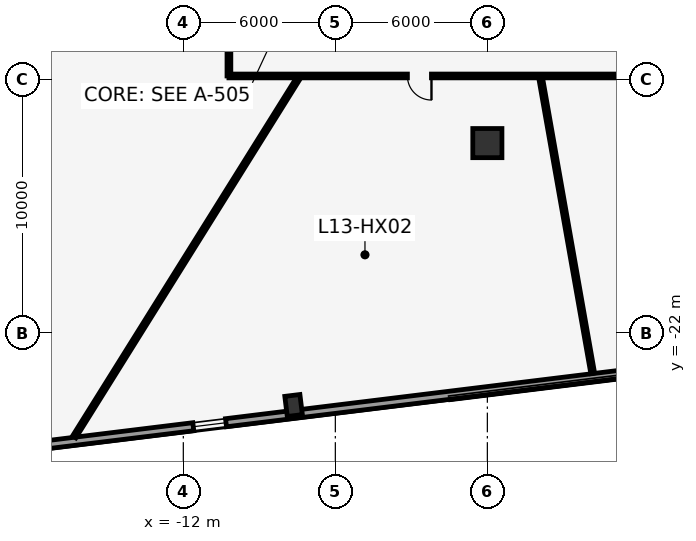
"""IFC4 building model, lengths in metres.
Left out: names, types, materials, properties, quantities, classifications, styles, units other than length and angle.
Written with IfcOpenShell. Run it as: python <this file> out.ifc"""

import sys

from ifc_helpers import new_model, si_unit, direction, frame, frame_2d, origin, origin_2d, place, context, subcontext, project, spatial, rectangle, hollow_rectangle, extrude, element, fill, save


model = new_model("IFC4")
c1 = context("Model", 3, precision=1e-05, world=origin(), true_north=direction((0.0, 1.0)))
c2 = subcontext(c1, "Body", "Model", "MODEL_VIEW")
j1 = project(units=[si_unit("LENGTHUNIT", "METRE"), si_unit("PLANEANGLEUNIT", "RADIAN")], contexts=[c1])
p1 = place(None, origin())
s1 = spatial("IfcSite", under=j1, at=p1, CompositionType="ELEMENT")
p2 = place(p1, origin())
s2 = spatial("IfcBuilding", under=s1, at=p2, CompositionType="ELEMENT")
p3 = place(p2, frame((0.0, 0.0, 62.4)))
s3 = spatial("IfcBuildingStorey", under=s2, at=p3, CompositionType="ELEMENT", Elevation=62.4)
p4 = place(p3, frame((0.0, -14.5, 0.0), z_axis=(0.0, 0.0, 1.0), x_axis=(1.0, 0.0, 0.0)))
e1 = element("IfcColumn", 1, at=p4, inside=s3, PredefinedType="COLUMN", context=c2, shape_type="SweptSolid", body=[
    extrude(rectangle(XDim=1.15, YDim=1.15, at=origin_2d()), origin(), (0.0, 0.0, 1.0), 4.6),
])
p5 = place(p3, frame((-7.647, -24.856, 0.0), z_axis=(0.0, 0.0, 1.0), x_axis=(0.992546151641, 0.121869343405, 0.0)))
e2 = element("IfcColumn", 2, at=p5, inside=s3, PredefinedType="COLUMN", context=c2, shape_type="SweptSolid", body=[
    extrude(hollow_rectangle(XDim=0.6, YDim=0.8, WallThickness=0.05, at=origin_2d()), origin(), (0.0, 0.0, 1.0), 4.6),
])
p6 = place(p3, frame((-0.115, 39.555, 0.0), z_axis=(0.0, 0.0, 1.0), x_axis=(0.605877389385, -0.795558036243, 0.0)))
e3 = element("IfcWall", 3, at=p6, inside=s3, PredefinedType="STANDARD", context=c2, shape_type="SweptSolid", body=[
    extrude(rectangle(XDim=64.058, YDim=0.32, at=frame_2d((32.029, 0.0))), origin(), (0.0, 0.0, 1.0), 4.35),
])
p7 = place(p6, frame((6.179, 0.0, 0.85)))
e4 = element("IfcOpeningElement", 4, at=p7, cuts=e3, PredefinedType="OPENING", context=c2, shape_type="SweptSolid", body=[
    extrude(rectangle(XDim=1.3, YDim=2.1, at=frame_2d((0.65, 1.05))), frame((0.0, 0.17, 0.0), z_axis=(0.0, -1.0, 0.0), x_axis=(1.0, 0.0, 0.0)), (0.0, 0.0, 1.0), 0.34),
])
p8 = place(p6, frame((11.779, 0.0, 0.85)))
e5 = element("IfcOpeningElement", 5, at=p8, cuts=e3, PredefinedType="OPENING", context=c2, shape_type="SweptSolid", body=[
    extrude(rectangle(XDim=1.3, YDim=2.1, at=frame_2d((0.65, 1.05))), frame((0.0, 0.17, 0.0), z_axis=(0.0, -1.0, 0.0), x_axis=(1.0, 0.0, 0.0)), (0.0, 0.0, 1.0), 0.34),
])
p9 = place(p6, frame((17.379, 0.0, 0.85)))
e6 = element("IfcOpeningElement", 6, at=p9, cuts=e3, PredefinedType="OPENING", context=c2, shape_type="SweptSolid", body=[
    extrude(rectangle(XDim=1.3, YDim=2.1, at=frame_2d((0.65, 1.05))), frame((0.0, 0.17, 0.0), z_axis=(0.0, -1.0, 0.0), x_axis=(1.0, 0.0, 0.0)), (0.0, 0.0, 1.0), 0.34),
])
p10 = place(p6, frame((50.979, 0.0, 0.85)))
e7 = element("IfcOpeningElement", 7, at=p10, cuts=e3, PredefinedType="OPENING", context=c2, shape_type="SweptSolid", body=[
    extrude(rectangle(XDim=1.3, YDim=2.1, at=frame_2d((0.65, 1.05))), frame((0.0, 0.17, 0.0), z_axis=(0.0, -1.0, 0.0), x_axis=(1.0, 0.0, 0.0)), (0.0, 0.0, 1.0), 0.34),
])
p11 = place(p6, frame((56.579, 0.0, 0.85)))
e8 = element("IfcOpeningElement", 8, at=p11, cuts=e3, PredefinedType="OPENING", context=c2, shape_type="SweptSolid", body=[
    extrude(rectangle(XDim=1.3, YDim=2.1, at=frame_2d((0.65, 1.05))), frame((0.0, 0.17, 0.0), z_axis=(0.0, -1.0, 0.0), x_axis=(1.0, 0.0, 0.0)), (0.0, 0.0, 1.0), 0.34),
])
p12 = place(p3, frame((35.091, -19.961, 0.0), z_axis=(0.0, 0.0, 1.0), x_axis=(-0.992546286146, -0.121868247946, 0.0)))
e9 = element("IfcWall", 9, at=p12, inside=s3, PredefinedType="STANDARD", context=c2, shape_type="SweptSolid", body=[
    extrude(rectangle(XDim=64.793, YDim=0.32, at=frame_2d((32.396, 0.0))), origin(), (0.0, 0.0, 1.0), 4.35),
])
p13 = place(p12, frame((12.147, 0.0, 0.85)))
e10 = element("IfcOpeningElement", 10, at=p13, cuts=e9, PredefinedType="OPENING", context=c2, shape_type="SweptSolid", body=[
    extrude(rectangle(XDim=1.3, YDim=2.1, at=frame_2d((0.65, 1.05))), frame((0.0, 0.17, 0.0), z_axis=(0.0, -1.0, 0.0), x_axis=(1.0, 0.0, 0.0)), (0.0, 0.0, 1.0), 0.34),
])
p14 = place(p12, frame((17.747, 0.0, 0.85)))
e11 = element("IfcOpeningElement", 11, at=p14, cuts=e9, PredefinedType="OPENING", context=c2, shape_type="SweptSolid", body=[
    extrude(rectangle(XDim=1.3, YDim=2.1, at=frame_2d((0.65, 1.05))), frame((0.0, 0.17, 0.0), z_axis=(0.0, -1.0, 0.0), x_axis=(1.0, 0.0, 0.0)), (0.0, 0.0, 1.0), 0.34),
])
p15 = place(p12, frame((45.747, 0.0, 0.85)))
e12 = element("IfcOpeningElement", 12, at=p15, cuts=e9, PredefinedType="OPENING", context=c2, shape_type="SweptSolid", body=[
    extrude(rectangle(XDim=1.3, YDim=2.1, at=frame_2d((0.65, 1.05))), frame((0.0, 0.17, 0.0), z_axis=(0.0, -1.0, 0.0), x_axis=(1.0, 0.0, 0.0)), (0.0, 0.0, 1.0), 0.34),
])
p16 = place(p12, frame((56.947, 0.0, 0.85)))
e13 = element("IfcOpeningElement", 13, at=p16, cuts=e9, PredefinedType="OPENING", context=c2, shape_type="SweptSolid", body=[
    extrude(rectangle(XDim=1.3, YDim=2.1, at=frame_2d((0.65, 1.05))), frame((0.0, 0.17, 0.0), z_axis=(0.0, -1.0, 0.0), x_axis=(1.0, 0.0, 0.0)), (0.0, 0.0, 1.0), 0.34),
])
p17 = place(p3, frame((-34.787, -20.429, 0.0), z_axis=(0.0, 0.0, 1.0), x_axis=(0.395418293843, 0.91850115563, 0.0)))
e14 = element("IfcWall", 14, at=p17, inside=s3, PredefinedType="STANDARD", context=c2, shape_type="SweptSolid", body=[
    extrude(rectangle(XDim=64.058, YDim=0.32, at=frame_2d((32.029, 0.0))), origin(), (0.0, 0.0, 1.0), 4.35),
])
p18 = place(p17, frame((23.542, 0.0, 0.0)))
e15 = element("IfcOpeningElement", 15, at=p18, cuts=e14, PredefinedType="OPENING", context=c2, shape_type="SweptSolid", body=[
    extrude(rectangle(XDim=1.6, YDim=2.2, at=frame_2d((0.8, 1.1))), frame((0.0, 0.17, 0.0), z_axis=(0.0, -1.0, 0.0), x_axis=(1.0, 0.0, 0.0)), (0.0, 0.0, 1.0), 0.34),
])
p19 = place(p17, frame((6.179, 0.0, 0.85)))
e16 = element("IfcOpeningElement", 16, at=p19, cuts=e14, PredefinedType="OPENING", context=c2, shape_type="SweptSolid", body=[
    extrude(rectangle(XDim=1.3, YDim=2.1, at=frame_2d((0.65, 1.05))), frame((0.0, 0.17, 0.0), z_axis=(0.0, -1.0, 0.0), x_axis=(1.0, 0.0, 0.0)), (0.0, 0.0, 1.0), 0.34),
])
p20 = place(p17, frame((17.379, 0.0, 0.85)))
e17 = element("IfcOpeningElement", 17, at=p20, cuts=e14, PredefinedType="OPENING", context=c2, shape_type="SweptSolid", body=[
    extrude(rectangle(XDim=1.3, YDim=2.1, at=frame_2d((0.65, 1.05))), frame((0.0, 0.17, 0.0), z_axis=(0.0, -1.0, 0.0), x_axis=(1.0, 0.0, 0.0)), (0.0, 0.0, 1.0), 0.34),
])
p21 = place(p17, frame((45.379, 0.0, 0.85)))
e18 = element("IfcOpeningElement", 18, at=p21, cuts=e14, PredefinedType="OPENING", context=c2, shape_type="SweptSolid", body=[
    extrude(rectangle(XDim=1.3, YDim=2.1, at=frame_2d((0.65, 1.05))), frame((0.0, 0.17, 0.0), z_axis=(0.0, -1.0, 0.0), x_axis=(1.0, 0.0, 0.0)), (0.0, 0.0, 1.0), 0.34),
])
p22 = place(p17, frame((50.979, 0.0, 0.85)))
e19 = element("IfcOpeningElement", 19, at=p22, cuts=e14, PredefinedType="OPENING", context=c2, shape_type="SweptSolid", body=[
    extrude(rectangle(XDim=1.3, YDim=2.1, at=frame_2d((0.65, 1.05))), frame((0.0, 0.17, 0.0), z_axis=(0.0, -1.0, 0.0), x_axis=(1.0, 0.0, 0.0)), (0.0, 0.0, 1.0), 0.34),
])
p23 = place(p17, frame((56.579, 0.0, 0.85)))
e20 = element("IfcOpeningElement", 20, at=p23, cuts=e14, PredefinedType="OPENING", context=c2, shape_type="SweptSolid", body=[
    extrude(rectangle(XDim=1.3, YDim=2.1, at=frame_2d((0.65, 1.05))), frame((0.0, 0.17, 0.0), z_axis=(0.0, -1.0, 0.0), x_axis=(1.0, 0.0, 0.0)), (0.0, 0.0, 1.0), 0.34),
])
p24 = place(p3, frame((10.2, -11.85, 0.0), z_axis=(0.0, 0.0, 1.0), x_axis=(-1.0, 0.0, 0.0)))
e21 = element("IfcWall", 21, at=p24, inside=s3, PredefinedType="PARTITIONING", context=c2, shape_type="SweptSolid", body=[
    extrude(rectangle(XDim=20.4, YDim=0.15, at=frame_2d((10.2, 0.0))), origin(), (0.0, 0.0, 1.0), 4.35),
])
p25 = place(p24, frame((12.406, 0.0, 0.0)))
e22 = element("IfcOpeningElement", 22, at=p25, cuts=e21, PredefinedType="OPENING", context=c2, shape_type="SweptSolid", body=[
    extrude(rectangle(XDim=0.95, YDim=2.15, at=frame_2d((0.475, 1.075))), frame((0.0, 0.085, 0.0), z_axis=(0.0, -1.0, 0.0), x_axis=(1.0, 0.0, 0.0)), (0.0, 0.0, 1.0), 0.17),
])
p26 = place(p24, frame((3.701, 0.0, 0.0)))
e23 = element("IfcOpeningElement", 23, at=p26, cuts=e21, PredefinedType="OPENING", context=c2, shape_type="SweptSolid", body=[
    extrude(rectangle(XDim=0.95, YDim=2.15, at=frame_2d((0.475, 1.075))), frame((0.0, 0.085, 0.0), z_axis=(0.0, -1.0, 0.0), x_axis=(1.0, 0.0, 0.0)), (0.0, 0.0, 1.0), 0.17),
])
p27 = place(p3, frame((-10.2, -11.85, 0.0), z_axis=(0.0, 0.0, 1.0), x_axis=(0.0, 1.0, 0.0)))
e24 = element("IfcWall", 24, at=p27, inside=s3, PredefinedType="PARTITIONING", context=c2, shape_type="SweptSolid", body=[
    extrude(rectangle(XDim=24.0, YDim=0.15, at=frame_2d((12.0, 0.0))), origin(), (0.0, 0.0, 1.0), 4.35),
])
p28 = place(p27, frame((11.995, 0.0, 0.0)))
e25 = element("IfcOpeningElement", 25, at=p28, cuts=e24, PredefinedType="OPENING", context=c2, shape_type="SweptSolid", body=[
    extrude(rectangle(XDim=0.95, YDim=2.15, at=frame_2d((0.475, 1.075))), frame((0.0, 0.085, 0.0), z_axis=(0.0, -1.0, 0.0), x_axis=(1.0, 0.0, 0.0)), (0.0, 0.0, 1.0), 0.17),
])
p29 = place(p27, frame((3.905, 0.0, 0.0)))
e26 = element("IfcOpeningElement", 26, at=p29, cuts=e24, PredefinedType="OPENING", context=c2, shape_type="SweptSolid", body=[
    extrude(rectangle(XDim=0.95, YDim=2.15, at=frame_2d((0.475, 1.075))), frame((0.0, 0.085, 0.0), z_axis=(0.0, -1.0, 0.0), x_axis=(1.0, 0.0, 0.0)), (0.0, 0.0, 1.0), 0.17),
])
p30 = place(p27, frame((19.615, 0.0, 0.0)))
e27 = element("IfcOpeningElement", 27, at=p30, cuts=e24, PredefinedType="OPENING", context=c2, shape_type="SweptSolid", body=[
    extrude(rectangle(XDim=0.95, YDim=2.15, at=frame_2d((0.475, 1.075))), frame((0.0, 0.085, 0.0), z_axis=(0.0, -1.0, 0.0), x_axis=(1.0, 0.0, 0.0)), (0.0, 0.0, 1.0), 0.17),
])
p31 = place(p3, frame((-7.47, -11.955, 0.0), z_axis=(0.0, 0.0, 1.0), x_axis=(-0.529931816238, -0.848040252664, 0.0)))
e28 = element("IfcWall", 28, at=p31, inside=s3, PredefinedType="PARTITIONING", context=c2, shape_type="SweptSolid", body=[
    extrude(rectangle(XDim=16.674, YDim=0.15, at=frame_2d((8.337, 0.0))), origin(), (0.0, 0.0, 1.0), 4.35),
])
p32 = place(p3, frame((2.108, -11.955, 0.0), z_axis=(0.0, 0.0, 1.0), x_axis=(0.173649679507, -0.984807488196, 0.0)))
e29 = element("IfcWall", 29, at=p32, inside=s3, PredefinedType="PARTITIONING", context=c2, shape_type="SweptSolid", body=[
    extrude(rectangle(XDim=11.807, YDim=0.15, at=frame_2d((5.904, 0.0))), origin(), (0.0, 0.0, 1.0), 4.35),
])
p33 = place(p15, origin())
e30 = element("IfcWindow", 30, at=p33, inside=s3, PartitioningType="SINGLE_PANEL", PredefinedType="WINDOW", context=c2, shape_type="SweptSolid", body=[
    extrude(rectangle(XDim=1.3, YDim=2.1, at=frame_2d((0.65, 1.05))), frame((0.0, 0.03, 0.0), z_axis=(0.0, -1.0, 0.0), x_axis=(1.0, 0.0, 0.0)), (0.0, 0.0, 1.0), 0.06),
])
fill(e12, e30)
p34 = place(p25, origin())
e31 = element("IfcDoor", 31, at=p34, inside=s3, OperationType="SINGLE_SWING_LEFT", PredefinedType="DOOR", context=c2, shape_type="SweptSolid", body=[
    extrude(rectangle(XDim=0.95, YDim=2.15, at=frame_2d((0.475, 1.075))), frame((0.0, 0.025, 0.0), z_axis=(0.0, -1.0, 0.0), x_axis=(1.0, 0.0, 0.0)), (0.0, 0.0, 1.0), 0.05),
])
fill(e22, e31)
save(model, sys.argv[1])
